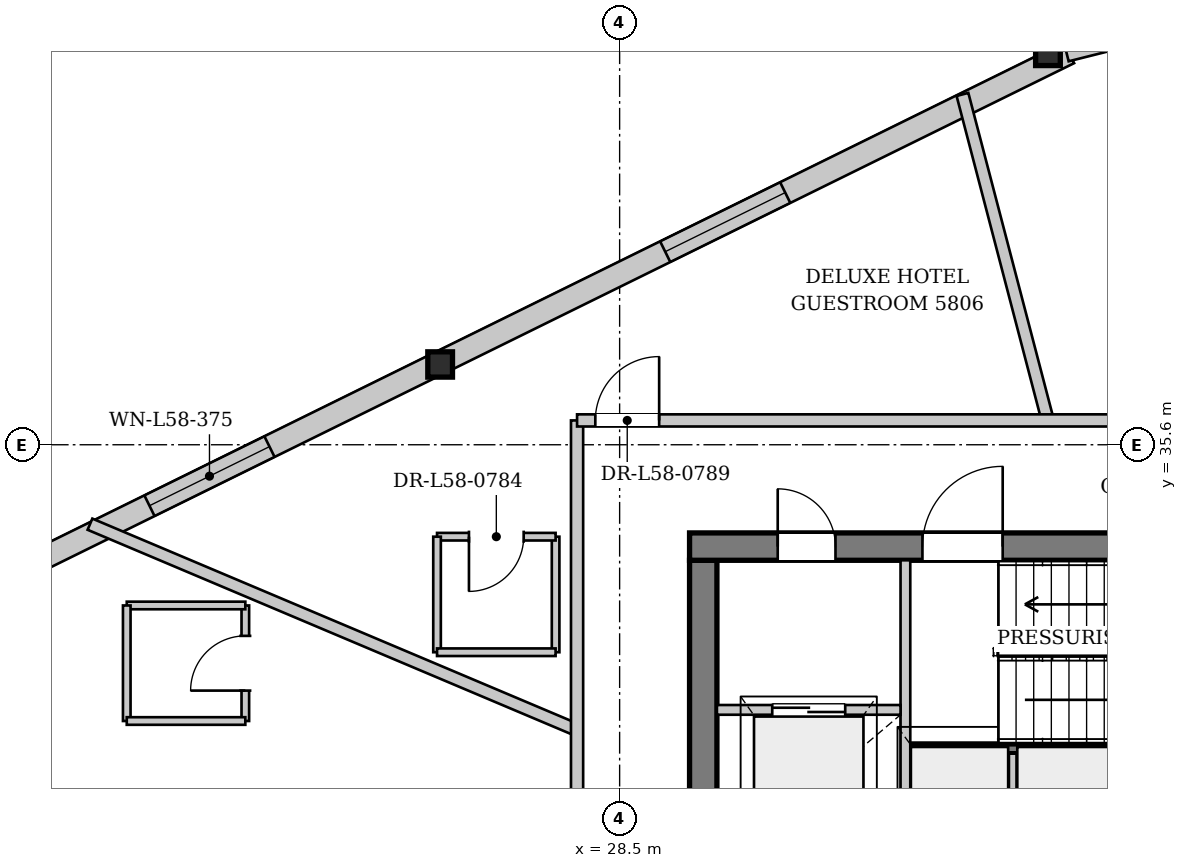
"""IFC4 building model, lengths in metres.
Left out: names, types, materials, properties, quantities, classifications, styles, units other than length and angle.
Written with IfcOpenShell. Run it as: python <this file> out.ifc"""

import sys

from ifc_helpers import new_model, si_unit, direction, frame, frame_2d, origin, origin_2d, place, context, subcontext, project, spatial, rectangle, i_section, extrude, source, transform, mapped, element, fill, save


model = new_model("IFC4")
c1 = context("Model", 3, precision=1e-05, world=origin(), true_north=direction((0.0, 1.0)))
c2 = subcontext(c1, "Body", "Model", "MODEL_VIEW")
j1 = project(units=[si_unit("LENGTHUNIT", "METRE"), si_unit("PLANEANGLEUNIT", "RADIAN")], contexts=[c1])
p1 = place(None, origin())
s1 = spatial("IfcSite", under=j1, at=p1, CompositionType="ELEMENT")
p2 = place(p1, origin())
s2 = spatial("IfcBuilding", under=s1, at=p2, CompositionType="ELEMENT")
p3 = place(p2, frame((0.0, 0.0, 220.25)))
s3 = spatial("IfcBuildingStorey", under=s2, at=p3, CompositionType="ELEMENT", Elevation=220.25)
m1 = source(origin(), c2, "Body", "SweptSolid", [
    extrude(i_section(OverallWidth=0.406, OverallDepth=0.416, WebThickness=0.027, FlangeThickness=0.042, at=origin_2d()), origin(), (0.0, 0.0, 1.0), 3.443),
])
p4 = place(p3, frame((35.807, 42.216, 0.0), z_axis=(-0.152464136085, -0.100200848506, 0.983216393866), x_axis=(0.549216666266, -0.835679994672, 0.0)))
e1 = element("IfcColumn", 1, at=p4, inside=s3, PredefinedType="COLUMN", context=c2, shape_type="MappedRepresentation", body=[
    mapped(m1, transform((0.0, 0.0, 0.0), x_axis=(1.0, 0.0, 0.0), y_axis=(0.0, 1.0, 0.0), z_axis=(0.0, 0.0, 1.0), scale=1.0)),
])
m2 = source(origin(), c2, "Body", "SweptSolid", [
    extrude(i_section(OverallWidth=0.406, OverallDepth=0.416, WebThickness=0.027, FlangeThickness=0.042, at=origin_2d()), origin(), (0.0, 0.0, 1.0), 3.461),
])
p5 = place(p3, frame((25.71, 37.243, 0.0), z_axis=(-0.093250881233, -0.186572300198, 0.978005649241), x_axis=(0.89449481743, -0.447078317067, 0.0)))
e2 = element("IfcColumn", 2, at=p5, inside=s3, PredefinedType="COLUMN", context=c2, shape_type="MappedRepresentation", body=[
    mapped(m2, transform((0.0, 0.0, 0.0), x_axis=(1.0, 0.0, 0.0), y_axis=(0.0, 1.0, 0.0), z_axis=(0.0, 0.0, 1.0), scale=1.0)),
])
p6 = place(p3, frame((15.696, 32.1, 0.0), z_axis=(0.0, 0.0, 1.0), x_axis=(0.89709423073, 0.441839270766, 0.0)))
e3 = element("IfcWall", 3, at=p6, inside=s3, PredefinedType="SOLIDWALL", context=c2, shape_type="SweptSolid", body=[
    extrude(rectangle(XDim=22.511, YDim=0.38, at=frame_2d((11.255, 0.0))), origin(), (0.0, 0.0, 1.0), 2.822),
])
p7 = place(p6, frame((5.653, 0.0, 0.452)))
e4 = element("IfcOpeningElement", 4, at=p7, cuts=e3, PredefinedType="OPENING", context=c2, shape_type="SweptSolid", body=[
    extrude(rectangle(XDim=2.2, YDim=2.25, at=frame_2d((1.1, 1.125))), frame((0.0, 0.2, 0.0), z_axis=(0.0, -1.0, 0.0), x_axis=(1.0, 0.0, 0.0)), (0.0, 0.0, 1.0), 0.4),
])
p8 = place(p6, frame((15.108, 0.0, 0.452)))
e5 = element("IfcOpeningElement", 5, at=p8, cuts=e3, PredefinedType="OPENING", context=c2, shape_type="SweptSolid", body=[
    extrude(rectangle(XDim=2.2, YDim=2.25, at=frame_2d((1.1, 1.125))), frame((0.0, 0.2, 0.0), z_axis=(0.0, -1.0, 0.0), x_axis=(1.0, 0.0, 0.0)), (0.0, 0.0, 1.0), 0.4),
])
p9 = place(p3, frame((35.846, 42.061, 0.0), z_axis=(0.0, 0.0, 1.0), x_axis=(0.969934169837, 0.243367430408, 0.0)))
e6 = element("IfcWall", 6, at=p9, inside=s3, PredefinedType="SOLIDWALL", context=c2, shape_type="SweptSolid", body=[
    extrude(rectangle(XDim=22.511, YDim=0.32, at=frame_2d((11.256, 0.0))), origin(), (0.0, 0.0, 1.0), 2.822),
])
p10 = place(p9, frame((6.454, 0.0, 0.0)))
e7 = element("IfcOpeningElement", 7, at=p10, cuts=e6, PredefinedType="OPENING", context=c2, shape_type="SweptSolid", body=[
    extrude(rectangle(XDim=1.5, YDim=2.3, at=frame_2d((0.75, 1.15))), frame((0.0, 0.17, 0.0), z_axis=(0.0, -1.0, 0.0), x_axis=(1.0, 0.0, 0.0)), (0.0, 0.0, 1.0), 0.34),
])
p11 = place(p9, frame((15.358, 0.0, 0.352)))
e8 = element("IfcOpeningElement", 8, at=p11, cuts=e6, PredefinedType="OPENING", context=c2, shape_type="SweptSolid", body=[
    extrude(rectangle(XDim=2.6, YDim=2.35, at=frame_2d((1.3, 1.175))), frame((0.0, 0.17, 0.0), z_axis=(0.0, -1.0, 0.0), x_axis=(1.0, 0.0, 0.0)), (0.0, 0.0, 1.0), 0.34),
])
p12 = place(p3, frame((29.875, 19.5, 0.0), z_axis=(0.0, 0.0, 1.0), x_axis=(0.0, 1.0, 0.0)))
e9 = element("IfcWall", 9, at=p12, inside=s3, PredefinedType="SHEAR", context=c2, shape_type="SweptSolid", body=[
    extrude(rectangle(XDim=14.2, YDim=0.45, at=frame_2d((7.1, 0.0))), origin(), (0.0, 0.0, 1.0), 3.33),
])
p13 = place(p12, frame((7.42, 0.0, 0.0)))
e10 = element("IfcOpeningElement", 10, at=p13, cuts=e9, PredefinedType="OPENING", context=c2, shape_type="SweptSolid", body=[
    extrude(rectangle(XDim=1.6, YDim=2.2, at=frame_2d((0.8, 1.1))), frame((0.0, 0.235, 0.0), z_axis=(0.0, -1.0, 0.0), x_axis=(1.0, 0.0, 0.0)), (0.0, 0.0, 1.0), 0.47),
])
p14 = place(p3, frame((29.65, 33.925, 0.0), z_axis=(0.0, 0.0, 1.0), x_axis=(1.0, 0.0, 0.0)))
e11 = element("IfcWall", 11, at=p14, inside=s3, PredefinedType="SHEAR", context=c2, shape_type="SweptSolid", body=[
    extrude(rectangle(XDim=16.7, YDim=0.45, at=frame_2d((8.35, 0.0))), origin(), (0.0, 0.0, 1.0), 3.33),
])
p15 = place(p14, frame((1.45, 0.0, 0.0)))
e12 = element("IfcOpeningElement", 12, at=p15, cuts=e11, PredefinedType="OPENING", context=c2, shape_type="SweptSolid", body=[
    extrude(rectangle(XDim=0.95, YDim=2.1, at=frame_2d((0.475, 1.05))), frame((0.0, 0.235, 0.0), z_axis=(0.0, -1.0, 0.0), x_axis=(1.0, 0.0, 0.0)), (0.0, 0.0, 1.0), 0.47),
])
p16 = place(p14, frame((3.83, 0.0, 0.0)))
e13 = element("IfcOpeningElement", 13, at=p16, cuts=e11, PredefinedType="OPENING", context=c2, shape_type="SweptSolid", body=[
    extrude(rectangle(XDim=1.32, YDim=2.2, at=frame_2d((0.66, 1.1))), frame((0.0, 0.235, 0.0), z_axis=(0.0, -1.0, 0.0), x_axis=(1.0, 0.0, 0.0)), (0.0, 0.0, 1.0), 0.47),
])
p17 = place(p3, frame((33.28, 30.6, 0.0), z_axis=(0.0, 0.0, 1.0), x_axis=(1.0, 0.0, 0.0)))
e14 = element("IfcWall", 14, at=p17, inside=s3, PredefinedType="PARTITIONING", context=c2, shape_type="SweptSolid", body=[
    extrude(rectangle(XDim=7.3, YDim=0.16, at=frame_2d((3.65, 0.0))), origin(), (0.0, 0.0, 1.0), 3.33),
])
p18 = place(p3, frame((33.2, 28.44, 0.0), z_axis=(0.0, 0.0, 1.0), x_axis=(0.0, 1.0, 0.0)))
e15 = element("IfcWall", 15, at=p18, inside=s3, PredefinedType="PARTITIONING", context=c2, shape_type="SweptSolid", body=[
    extrude(rectangle(XDim=5.26, YDim=0.16, at=frame_2d((2.63, 0.0))), origin(), (0.0, 0.0, 1.0), 3.33),
])
p19 = place(p3, frame((30.1, 31.24, 0.0), z_axis=(0.0, 0.0, 1.0), x_axis=(1.0, 0.0, 0.0)))
e16 = element("IfcWall", 16, at=p19, inside=s3, PredefinedType="PARTITIONING", context=c2, shape_type="SweptSolid", body=[
    extrude(rectangle(XDim=3.02, YDim=0.16, at=frame_2d((1.51, 0.0))), origin(), (0.0, 0.0, 1.0), 3.33),
])
p20 = place(p19, frame((0.91, 0.0, 0.0)))
e17 = element("IfcOpeningElement", 17, at=p20, cuts=e16, PredefinedType="OPENING", context=c2, shape_type="SweptSolid", body=[
    extrude(rectangle(XDim=1.2, YDim=2.2, at=frame_2d((0.6, 1.1))), frame((0.0, 0.09, 0.0), z_axis=(0.0, -1.0, 0.0), x_axis=(1.0, 0.0, 0.0)), (0.0, 0.0, 1.0), 0.18),
])
p21 = place(p3, frame((34.965, 28.6, 0.0), z_axis=(0.0, 0.0, 1.0), x_axis=(0.0, 1.0, 0.0)))
e18 = element("IfcWall", 18, at=p21, inside=s3, PredefinedType="PARTITIONING", context=c2, shape_type="SweptSolid", body=[
    extrude(rectangle(XDim=1.92, YDim=0.125, at=frame_2d((0.96, 0.0))), origin(), (0.0, 0.0, 1.0), 3.33),
])
p22 = place(p3, frame((35.541, 36.0, 0.0), z_axis=(0.0, 0.0, 1.0), x_axis=(-0.253105140305, 0.967438777366, 0.0)))
e19 = element("IfcWall", 19, at=p22, inside=s3, PredefinedType="PARTITIONING", context=c2, shape_type="SweptSolid", body=[
    extrude(rectangle(XDim=5.542, YDim=0.2, at=frame_2d((2.771, 0.0))), origin(), (0.0, 0.0, 1.0), 3.33),
])
p23 = place(p3, frame((27.8, 30.909, 0.0), z_axis=(0.0, 0.0, 1.0), x_axis=(-0.921162801318, 0.389177457553, 0.0)))
e20 = element("IfcWall", 20, at=p23, inside=s3, PredefinedType="PARTITIONING", context=c2, shape_type="SweptSolid", body=[
    extrude(rectangle(XDim=8.697, YDim=0.2, at=frame_2d((4.348, 0.0))), origin(), (0.0, 0.0, 1.0), 3.33),
])
p24 = place(p3, frame((27.447, 32.188, 0.0), z_axis=(0.0, 0.0, 1.0), x_axis=(0.0, 1.0, 0.0)))
e21 = element("IfcWall", 21, at=p24, inside=s3, PredefinedType="PARTITIONING", context=c2, shape_type="SweptSolid", body=[
    extrude(rectangle(XDim=1.9, YDim=0.125, at=frame_2d((0.95, 0.0))), origin(), (0.0, 0.0, 1.0), 3.33),
])
p25 = place(p3, frame((27.447, 34.088, 0.0), z_axis=(0.0, 0.0, 1.0), x_axis=(-1.0, 0.0, 0.0)))
e22 = element("IfcWall", 22, at=p25, inside=s3, PredefinedType="PARTITIONING", context=c2, shape_type="SweptSolid", body=[
    extrude(rectangle(XDim=1.95, YDim=0.125, at=frame_2d((0.975, 0.0))), origin(), (0.0, 0.0, 1.0), 3.33),
])
p26 = place(p25, frame((0.525, 0.0, 0.0)))
e23 = element("IfcOpeningElement", 23, at=p26, cuts=e22, PredefinedType="OPENING", context=c2, shape_type="SweptSolid", body=[
    extrude(rectangle(XDim=0.9, YDim=2.1, at=frame_2d((0.45, 1.05))), frame((0.0, 0.073, 0.0), z_axis=(0.0, -1.0, 0.0), x_axis=(1.0, 0.0, 0.0)), (0.0, 0.0, 1.0), 0.145),
])
p27 = place(p3, frame((25.497, 34.088, 0.0), z_axis=(0.0, 0.0, 1.0), x_axis=(0.0, -1.0, 0.0)))
e24 = element("IfcWall", 24, at=p27, inside=s3, PredefinedType="PARTITIONING", context=c2, shape_type="SweptSolid", body=[
    extrude(rectangle(XDim=1.9, YDim=0.125, at=frame_2d((0.95, 0.0))), origin(), (0.0, 0.0, 1.0), 3.33),
])
p28 = place(p3, frame((25.497, 32.188, 0.0), z_axis=(0.0, 0.0, 1.0), x_axis=(1.0, 0.0, 0.0)))
e25 = element("IfcWall", 25, at=p28, inside=s3, PredefinedType="PARTITIONING", context=c2, shape_type="SweptSolid", body=[
    extrude(rectangle(XDim=1.95, YDim=0.125, at=frame_2d((0.975, 0.0))), origin(), (0.0, 0.0, 1.0), 3.33),
])
p29 = place(p3, frame((22.344, 31.057, 0.0), z_axis=(0.0, 0.0, 1.0), x_axis=(0.0, 1.0, 0.0)))
e26 = element("IfcWall", 26, at=p29, inside=s3, PredefinedType="PARTITIONING", context=c2, shape_type="SweptSolid", body=[
    extrude(rectangle(XDim=1.9, YDim=0.125, at=frame_2d((0.95, 0.0))), origin(), (0.0, 0.0, 1.0), 3.33),
])
p30 = place(p29, frame((0.5, 0.0, 0.0)))
e27 = element("IfcOpeningElement", 27, at=p30, cuts=e26, PredefinedType="OPENING", context=c2, shape_type="SweptSolid", body=[
    extrude(rectangle(XDim=0.9, YDim=2.1, at=frame_2d((0.45, 1.05))), frame((0.0, 0.073, 0.0), z_axis=(0.0, -1.0, 0.0), x_axis=(1.0, 0.0, 0.0)), (0.0, 0.0, 1.0), 0.145),
])
p31 = place(p3, frame((22.344, 32.957, 0.0), z_axis=(0.0, 0.0, 1.0), x_axis=(-1.0, 0.0, 0.0)))
e28 = element("IfcWall", 28, at=p31, inside=s3, PredefinedType="PARTITIONING", context=c2, shape_type="SweptSolid", body=[
    extrude(rectangle(XDim=1.95, YDim=0.125, at=frame_2d((0.975, 0.0))), origin(), (0.0, 0.0, 1.0), 3.33),
])
p32 = place(p3, frame((20.394, 32.957, 0.0), z_axis=(0.0, 0.0, 1.0), x_axis=(0.0, -1.0, 0.0)))
e29 = element("IfcWall", 29, at=p32, inside=s3, PredefinedType="PARTITIONING", context=c2, shape_type="SweptSolid", body=[
    extrude(rectangle(XDim=1.9, YDim=0.125, at=frame_2d((0.95, 0.0))), origin(), (0.0, 0.0, 1.0), 3.33),
])
p33 = place(p3, frame((20.394, 31.057, 0.0), z_axis=(0.0, 0.0, 1.0), x_axis=(1.0, 0.0, 0.0)))
e30 = element("IfcWall", 30, at=p33, inside=s3, PredefinedType="PARTITIONING", context=c2, shape_type="SweptSolid", body=[
    extrude(rectangle(XDim=1.95, YDim=0.125, at=frame_2d((0.975, 0.0))), origin(), (0.0, 0.0, 1.0), 3.33),
])
p34 = place(p3, frame((27.8, 17.2, 0.0), z_axis=(0.0, 0.0, 1.0), x_axis=(0.0, 1.0, 0.0)))
e31 = element("IfcWall", 31, at=p34, inside=s3, PredefinedType="PARTITIONING", context=c2, shape_type="SweptSolid", body=[
    extrude(rectangle(XDim=18.8, YDim=0.2, at=frame_2d((9.4, 0.0))), origin(), (0.0, 0.0, 1.0), 3.33),
])
p35 = place(p34, frame((8.559, 0.0, 0.0)))
e32 = element("IfcOpeningElement", 32, at=p35, cuts=e31, PredefinedType="OPENING", context=c2, shape_type="SweptSolid", body=[
    extrude(rectangle(XDim=1.05, YDim=2.2, at=frame_2d((0.525, 1.1))), frame((0.0, 0.11, 0.0), z_axis=(0.0, -1.0, 0.0), x_axis=(1.0, 0.0, 0.0)), (0.0, 0.0, 1.0), 0.22),
])
p36 = place(p3, frame((27.8, 36.0, 0.0), z_axis=(0.0, 0.0, 1.0), x_axis=(1.0, 0.0, 0.0)))
e33 = element("IfcWall", 33, at=p36, inside=s3, PredefinedType="PARTITIONING", context=c2, shape_type="SweptSolid", body=[
    extrude(rectangle(XDim=13.2, YDim=0.2, at=frame_2d((6.6, 0.0))), origin(), (0.0, 0.0, 1.0), 3.33),
])
p37 = place(p36, frame((0.3, 0.0, 0.0)))
e34 = element("IfcOpeningElement", 34, at=p37, cuts=e33, PredefinedType="OPENING", context=c2, shape_type="SweptSolid", body=[
    extrude(rectangle(XDim=1.05, YDim=2.2, at=frame_2d((0.525, 1.1))), frame((0.0, 0.11, 0.0), z_axis=(0.0, -1.0, 0.0), x_axis=(1.0, 0.0, 0.0)), (0.0, 0.0, 1.0), 0.22),
])
m3 = source(origin(), c2, "Body", "SweptSolid", [
    extrude(rectangle(XDim=2.2, YDim=2.25, at=frame_2d((1.1, 1.125))), frame((0.0, 0.03, 0.0), z_axis=(0.0, -1.0, 0.0), x_axis=(1.0, 0.0, 0.0)), (0.0, 0.0, 1.0), 0.06),
])
p38 = place(p7, origin())
e35 = element("IfcWindow", 35, at=p38, inside=s3, PartitioningType="SINGLE_PANEL", PredefinedType="WINDOW", context=c2, shape_type="MappedRepresentation", body=[
    mapped(m3, transform((0.0, 0.0, 0.0), x_axis=(1.0, 0.0, 0.0), y_axis=(0.0, 1.0, 0.0), z_axis=(0.0, 0.0, 1.0), scale=1.0)),
])
fill(e4, e35)
p39 = place(p8, origin())
e36 = element("IfcWindow", 36, at=p39, inside=s3, PartitioningType="SINGLE_PANEL", PredefinedType="WINDOW", context=c2, shape_type="MappedRepresentation", body=[
    mapped(m3, transform((0.0, 0.0, 0.0), x_axis=(1.0, 0.0, 0.0), y_axis=(0.0, 1.0, 0.0), z_axis=(0.0, 0.0, 1.0), scale=1.0)),
])
fill(e5, e36)
m4 = source(origin(), c2, "Body", "SweptSolid", [
    extrude(rectangle(XDim=0.95, YDim=2.1, at=frame_2d((0.475, 1.05))), frame((0.0, 0.025, 0.0), z_axis=(0.0, -1.0, 0.0), x_axis=(1.0, 0.0, 0.0)), (0.0, 0.0, 1.0), 0.05),
])
p40 = place(p15, origin())
e37 = element("IfcDoor", 37, at=p40, inside=s3, OperationType="SINGLE_SWING_LEFT", PredefinedType="DOOR", context=c2, shape_type="MappedRepresentation", body=[
    mapped(m4, transform((0.0, 0.0, 0.0), x_axis=(1.0, 0.0, 0.0), y_axis=(0.0, 1.0, 0.0), z_axis=(0.0, 0.0, 1.0), scale=1.0)),
])
fill(e12, e37)
m5 = source(origin(), c2, "Body", "SweptSolid", [
    extrude(rectangle(XDim=1.32, YDim=2.2, at=frame_2d((0.66, 1.1))), frame((0.0, 0.025, 0.0), z_axis=(0.0, -1.0, 0.0), x_axis=(1.0, 0.0, 0.0)), (0.0, 0.0, 1.0), 0.05),
])
p41 = place(p16, origin())
e38 = element("IfcDoor", 38, at=p41, inside=s3, OperationType="SINGLE_SWING_RIGHT", PredefinedType="DOOR", context=c2, shape_type="MappedRepresentation", body=[
    mapped(m5, transform((0.0, 0.0, 0.0), x_axis=(1.0, 0.0, 0.0), y_axis=(0.0, 1.0, 0.0), z_axis=(0.0, 0.0, 1.0), scale=1.0)),
])
fill(e13, e38)
m6 = source(origin(), c2, "Body", "SweptSolid", [
    extrude(rectangle(XDim=1.2, YDim=2.2, at=frame_2d((0.6, 1.1))), frame((0.0, 0.025, 0.0), z_axis=(0.0, -1.0, 0.0), x_axis=(1.0, 0.0, 0.0)), (0.0, 0.0, 1.0), 0.05),
])
p42 = place(p20, origin())
e39 = element("IfcDoor", 39, at=p42, inside=s3, OperationType="DOUBLE_DOOR_SLIDING", PredefinedType="DOOR", context=c2, shape_type="MappedRepresentation", body=[
    mapped(m6, transform((0.0, 0.0, 0.0), x_axis=(1.0, 0.0, 0.0), y_axis=(0.0, 1.0, 0.0), z_axis=(0.0, 0.0, 1.0), scale=1.0)),
])
fill(e17, e39)
m7 = source(origin(), c2, "Body", "SweptSolid", [
    extrude(rectangle(XDim=0.9, YDim=2.1, at=frame_2d((0.45, 1.05))), frame((0.0, 0.025, 0.0), z_axis=(0.0, -1.0, 0.0), x_axis=(1.0, 0.0, 0.0)), (0.0, 0.0, 1.0), 0.05),
])
p43 = place(p26, origin())
e40 = element("IfcDoor", 40, at=p43, inside=s3, OperationType="SINGLE_SWING_RIGHT", PredefinedType="DOOR", context=c2, shape_type="MappedRepresentation", body=[
    mapped(m7, transform((0.0, 0.0, 0.0), x_axis=(1.0, 0.0, 0.0), y_axis=(0.0, 1.0, 0.0), z_axis=(0.0, 0.0, 1.0), scale=1.0)),
])
fill(e23, e40)
p44 = place(p30, origin())
e41 = element("IfcDoor", 41, at=p44, inside=s3, OperationType="SINGLE_SWING_LEFT", PredefinedType="DOOR", context=c2, shape_type="MappedRepresentation", body=[
    mapped(m7, transform((0.0, 0.0, 0.0), x_axis=(1.0, 0.0, 0.0), y_axis=(0.0, 1.0, 0.0), z_axis=(0.0, 0.0, 1.0), scale=1.0)),
])
fill(e27, e41)
m8 = source(origin(), c2, "Body", "SweptSolid", [
    extrude(rectangle(XDim=1.05, YDim=2.2, at=frame_2d((0.525, 1.1))), frame((0.0, 0.025, 0.0), z_axis=(0.0, -1.0, 0.0), x_axis=(1.0, 0.0, 0.0)), (0.0, 0.0, 1.0), 0.05),
])
p45 = place(p37, origin())
e42 = element("IfcDoor", 42, at=p45, inside=s3, OperationType="SINGLE_SWING_RIGHT", PredefinedType="DOOR", context=c2, shape_type="MappedRepresentation", body=[
    mapped(m8, transform((0.0, 0.0, 0.0), x_axis=(1.0, 0.0, 0.0), y_axis=(0.0, 1.0, 0.0), z_axis=(0.0, 0.0, 1.0), scale=1.0)),
])
fill(e34, e42)
save(model, sys.argv[1])
